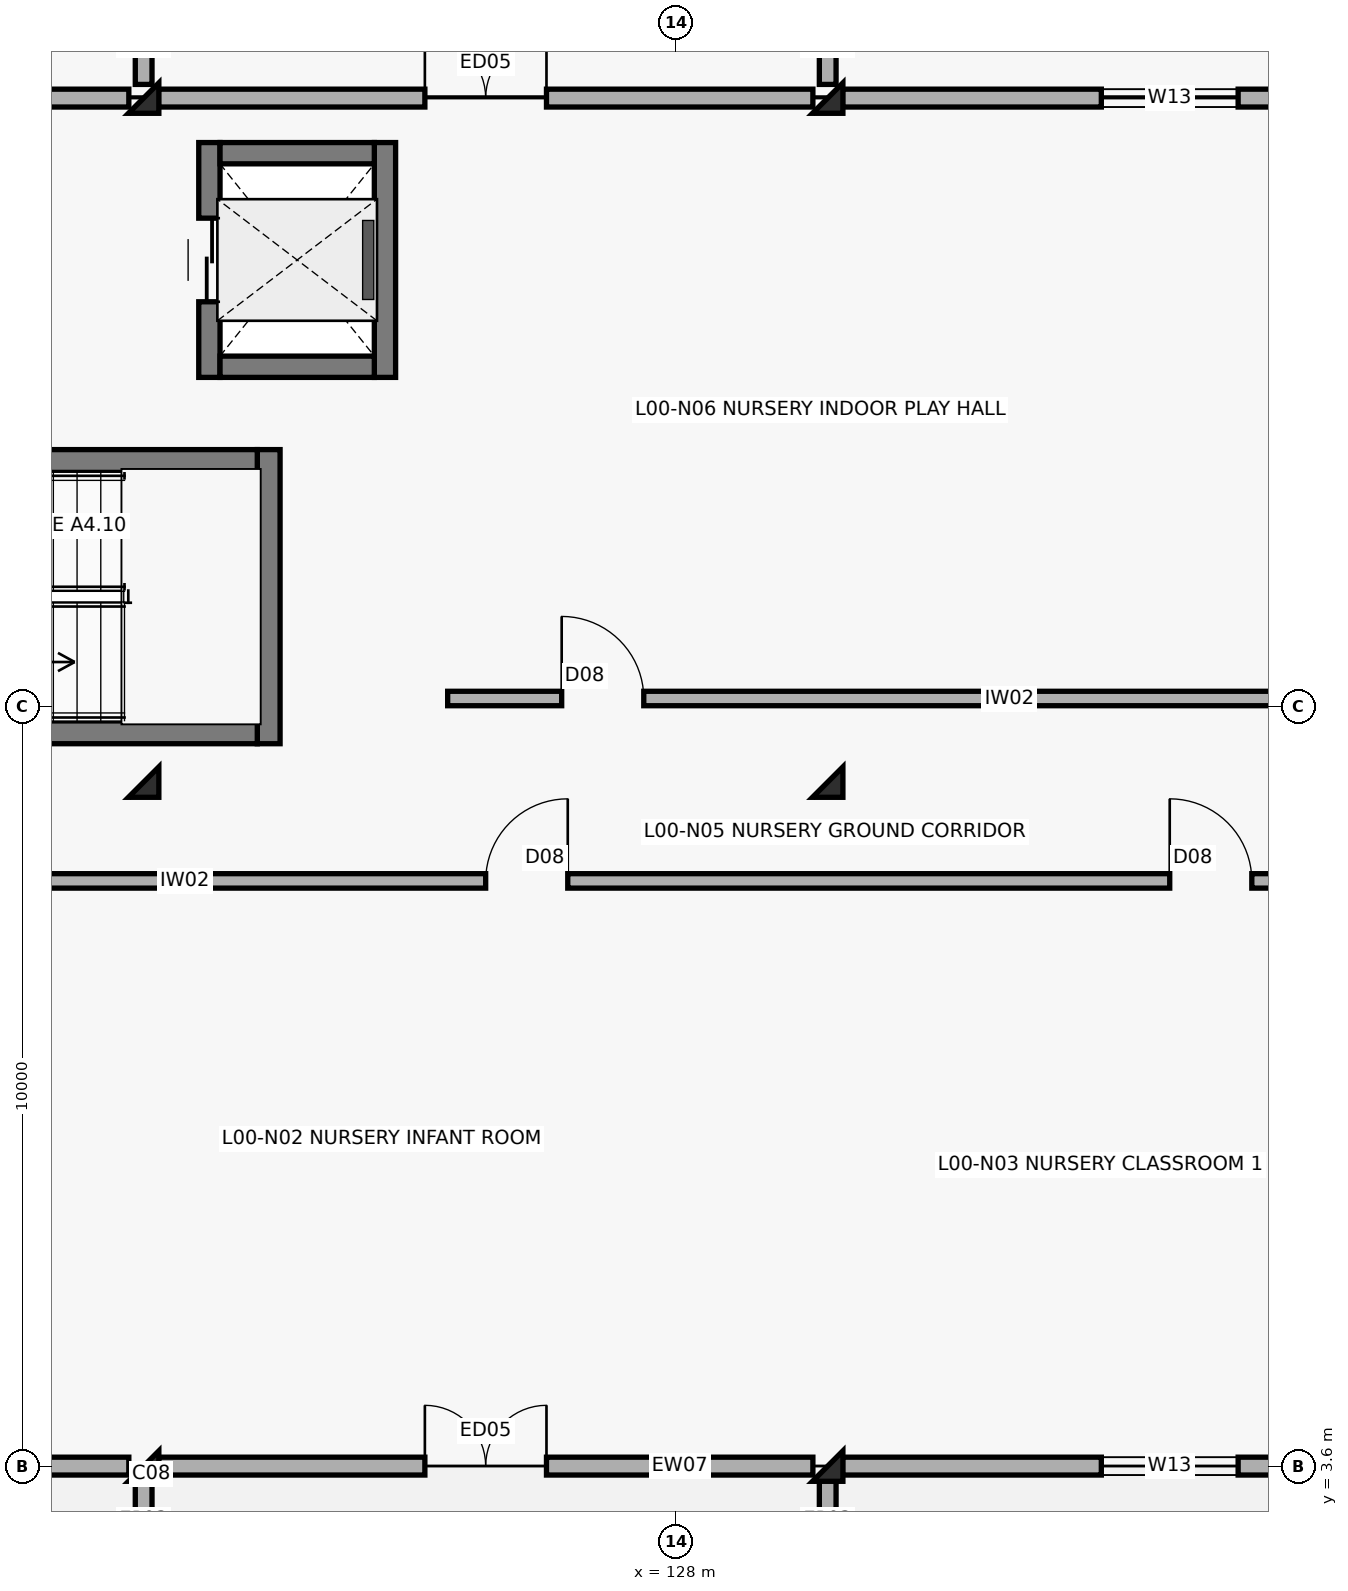
"""IFC4 building model, lengths in metres.
Left out: names, types, materials, properties, quantities, classifications, styles, units other than length and angle.
Written with IfcOpenShell. Run it as: python <this file> out.ifc"""

import sys

from ifc_helpers import new_model, si_unit, direction, frame, frame_2d, origin, origin_2d, place, context, subcontext, project, spatial, rectangle, extrude, element, fill, save


model = new_model("IFC4")
c1 = context("Model", 3, precision=1e-05, world=origin(), true_north=direction((0.0, 1.0)))
c2 = subcontext(c1, "Body", "Model", "MODEL_VIEW")
j1 = project(units=[si_unit("LENGTHUNIT", "METRE"), si_unit("PLANEANGLEUNIT", "RADIAN")], contexts=[c1])
p1 = place(None, origin())
s1 = spatial("IfcSite", under=j1, at=p1, CompositionType="ELEMENT")
p2 = place(p1, origin())
s2 = spatial("IfcBuilding", under=s1, at=p2, CompositionType="ELEMENT")
p3 = place(p2, origin())
s3 = spatial("IfcBuildingStorey", under=s2, at=p3, CompositionType="ELEMENT", Elevation=0.0)
for number, where, z_axis, x_axis in (
    (1, (121.0, 3.6, 0.0), (0.0, 0.0, 1.0), (1.0, 0.0, 0.0)),
    (2, (121.0, 12.6, 0.0), (0.0, 0.0, 1.0), (1.0, 0.0, 0.0)),
    (3, (121.0, 21.6, 0.0), (0.0, 0.0, 1.0), (1.0, 0.0, 0.0)),
    (4, (130.0, 3.6, 0.0), (0.0, 0.0, 1.0), (1.0, 0.0, 0.0)),
    (5, (130.0, 12.6, 0.0), (0.0, 0.0, 1.0), (1.0, 0.0, 0.0)),
    (6, (130.0, 21.6, 0.0), (0.0, 0.0, 1.0), (1.0, 0.0, 0.0)),
):
    element("IfcColumn", number, at=place(p3, frame(where, z_axis=z_axis, x_axis=x_axis)), inside=s3, PredefinedType="COLUMN", context=c2, shape_type="SweptSolid", body=[
        extrude(rectangle(XDim=0.4, YDim=0.4, at=origin_2d()), origin(), (0.0, 0.0, 1.0), 4.5),
    ])
p4 = place(p3, frame((112.195, 3.6, 0.0), z_axis=(0.0, 0.0, 1.0), x_axis=(1.0, 0.0, 0.0)))
e7 = element("IfcWall", 7, at=p4, inside=s3, PredefinedType="SOLIDWALL", context=c2, shape_type="SweptSolid", body=[
    extrude(rectangle(XDim=8.61, YDim=0.235, at=frame_2d((4.305, 0.0))), origin(), (0.0, 0.0, 1.0), 3.5),
])
p5 = place(p4, frame((3.405, 0.0, 0.45)))
e8 = element("IfcOpeningElement", 8, at=p5, cuts=e7, PredefinedType="OPENING", context=c2, shape_type="SweptSolid", body=[
    extrude(rectangle(XDim=1.8, YDim=1.8, at=frame_2d((0.9, 0.9))), frame((0.0, 0.127, 0.0), z_axis=(0.0, -1.0, 0.0), x_axis=(1.0, 0.0, 0.0)), (0.0, 0.0, 1.0), 0.255),
])
p6 = place(p3, frame((121.195, 3.6, 0.0), z_axis=(0.0, 0.0, 1.0), x_axis=(1.0, 0.0, 0.0)))
e9 = element("IfcWall", 9, at=p6, inside=s3, PredefinedType="SOLIDWALL", context=c2, shape_type="SweptSolid", body=[
    extrude(rectangle(XDim=8.61, YDim=0.235, at=frame_2d((4.305, 0.0))), origin(), (0.0, 0.0, 1.0), 3.5),
])
p7 = place(p6, frame((3.505, 0.0, 0.0)))
e10 = element("IfcOpeningElement", 10, at=p7, cuts=e9, PredefinedType="OPENING", context=c2, shape_type="SweptSolid", body=[
    extrude(rectangle(XDim=1.6, YDim=2.2, at=frame_2d((0.8, 1.1))), frame((0.0, 0.127, 0.0), z_axis=(0.0, -1.0, 0.0), x_axis=(1.0, 0.0, 0.0)), (0.0, 0.0, 1.0), 0.255),
])
p8 = place(p3, frame((130.195, 3.6, 0.0), z_axis=(0.0, 0.0, 1.0), x_axis=(1.0, 0.0, 0.0)))
e11 = element("IfcWall", 11, at=p8, inside=s3, PredefinedType="SOLIDWALL", context=c2, shape_type="SweptSolid", body=[
    extrude(rectangle(XDim=8.61, YDim=0.235, at=frame_2d((4.305, 0.0))), origin(), (0.0, 0.0, 1.0), 3.5),
])
p9 = place(p8, frame((3.405, 0.0, 0.45)))
e12 = element("IfcOpeningElement", 12, at=p9, cuts=e11, PredefinedType="OPENING", context=c2, shape_type="SweptSolid", body=[
    extrude(rectangle(XDim=1.8, YDim=1.8, at=frame_2d((0.9, 0.9))), frame((0.0, 0.127, 0.0), z_axis=(0.0, -1.0, 0.0), x_axis=(1.0, 0.0, 0.0)), (0.0, 0.0, 1.0), 0.255),
])
p10 = place(p3, frame((112.195, 21.6, 0.0), z_axis=(0.0, 0.0, 1.0), x_axis=(1.0, 0.0, 0.0)))
e13 = element("IfcWall", 13, at=p10, inside=s3, PredefinedType="SOLIDWALL", context=c2, shape_type="SweptSolid", body=[
    extrude(rectangle(XDim=8.61, YDim=0.235, at=frame_2d((4.305, 0.0))), origin(), (0.0, 0.0, 1.0), 3.5),
])
p11 = place(p10, frame((3.405, 0.0, 0.45)))
e14 = element("IfcOpeningElement", 14, at=p11, cuts=e13, PredefinedType="OPENING", context=c2, shape_type="SweptSolid", body=[
    extrude(rectangle(XDim=1.8, YDim=1.8, at=frame_2d((0.9, 0.9))), frame((0.0, 0.127, 0.0), z_axis=(0.0, -1.0, 0.0), x_axis=(1.0, 0.0, 0.0)), (0.0, 0.0, 1.0), 0.255),
])
p12 = place(p3, frame((121.195, 21.6, 0.0), z_axis=(0.0, 0.0, 1.0), x_axis=(1.0, 0.0, 0.0)))
e15 = element("IfcWall", 15, at=p12, inside=s3, PredefinedType="SOLIDWALL", context=c2, shape_type="SweptSolid", body=[
    extrude(rectangle(XDim=8.61, YDim=0.235, at=frame_2d((4.305, 0.0))), origin(), (0.0, 0.0, 1.0), 3.5),
])
p13 = place(p12, frame((3.505, 0.0, 0.0)))
e16 = element("IfcOpeningElement", 16, at=p13, cuts=e15, PredefinedType="OPENING", context=c2, shape_type="SweptSolid", body=[
    extrude(rectangle(XDim=1.6, YDim=2.2, at=frame_2d((0.8, 1.1))), frame((0.0, 0.127, 0.0), z_axis=(0.0, -1.0, 0.0), x_axis=(1.0, 0.0, 0.0)), (0.0, 0.0, 1.0), 0.255),
])
p14 = place(p3, frame((130.195, 21.6, 0.0), z_axis=(0.0, 0.0, 1.0), x_axis=(1.0, 0.0, 0.0)))
e17 = element("IfcWall", 17, at=p14, inside=s3, PredefinedType="SOLIDWALL", context=c2, shape_type="SweptSolid", body=[
    extrude(rectangle(XDim=8.61, YDim=0.235, at=frame_2d((4.305, 0.0))), origin(), (0.0, 0.0, 1.0), 3.5),
])
p15 = place(p14, frame((3.405, 0.0, 0.45)))
e18 = element("IfcOpeningElement", 18, at=p15, cuts=e17, PredefinedType="OPENING", context=c2, shape_type="SweptSolid", body=[
    extrude(rectangle(XDim=1.8, YDim=1.8, at=frame_2d((0.9, 0.9))), frame((0.0, 0.127, 0.0), z_axis=(0.0, -1.0, 0.0), x_axis=(1.0, 0.0, 0.0)), (0.0, 0.0, 1.0), 0.255),
])
for number, where, z_axis, x_axis in (
    (19, (121.0, 2.55, 0.0), (0.0, 0.0, 1.0), (0.0, 1.0, 0.0)),
    (20, (121.0, 21.78, 0.0), (0.0, 0.0, 1.0), (0.0, 1.0, 0.0)),
    (21, (130.0, 2.55, 0.0), (0.0, 0.0, 1.0), (0.0, 1.0, 0.0)),
    (22, (130.0, 21.78, 0.0), (0.0, 0.0, 1.0), (0.0, 1.0, 0.0)),
):
    element("IfcWall", number, at=place(p3, frame(where, z_axis=z_axis, x_axis=x_axis)), inside=s3, PredefinedType="PARAPET", context=c2, shape_type="SweptSolid", body=[
        extrude(rectangle(XDim=0.87, YDim=0.22, at=frame_2d((0.435, 0.0))), origin(), (0.0, 0.0, 1.0), 4.5),
    ])
p16 = place(p3, frame((122.645, 13.105, 0.0), z_axis=(0.0, 0.0, 1.0), x_axis=(0.0, 1.0, 0.0)))
e23 = element("IfcWall", 23, at=p16, inside=s3, PredefinedType="SHEAR", context=c2, shape_type="SweptSolid", body=[
    extrude(rectangle(XDim=3.87, YDim=0.3, at=frame_2d((1.935, 0.0))), origin(), (0.0, 0.0, 1.0), 4.5),
])
for number, where, z_axis, x_axis in (
    (24, (114.805, 13.255, 0.0), (0.0, 0.0, 1.0), (1.0, 0.0, 0.0)),
    (25, (114.805, 16.825, 0.0), (0.0, 0.0, 1.0), (1.0, 0.0, 0.0)),
):
    element("IfcWall", number, at=place(p3, frame(where, z_axis=z_axis, x_axis=x_axis)), inside=s3, PredefinedType="SHEAR", context=c2, shape_type="SweptSolid", body=[
        extrude(rectangle(XDim=7.69, YDim=0.3, at=frame_2d((3.845, 0.0))), origin(), (0.0, 0.0, 1.0), 4.5),
    ])
p17 = place(p3, frame((121.865, 17.925, 0.0), z_axis=(0.0, 0.0, 1.0), x_axis=(0.0, 1.0, 0.0)))
e26 = element("IfcWall", 26, at=p17, inside=s3, PredefinedType="SHEAR", context=c2, shape_type="SweptSolid", body=[
    extrude(rectangle(XDim=3.09, YDim=0.28, at=frame_2d((1.545, 0.0))), origin(), (0.0, 0.0, 1.0), 4.5),
])
p18 = place(p17, frame((0.995, 0.0, 0.0)))
e27 = element("IfcOpeningElement", 27, at=p18, cuts=e26, PredefinedType="OPENING", context=c2, shape_type="SweptSolid", body=[
    extrude(rectangle(XDim=1.1, YDim=2.15, at=frame_2d((0.55, 1.075))), frame((0.0, 0.15, 0.0), z_axis=(0.0, -1.0, 0.0), x_axis=(1.0, 0.0, 0.0)), (0.0, 0.0, 1.0), 0.3),
])
p19 = place(p3, frame((124.175, 17.925, 0.0), z_axis=(0.0, 0.0, 1.0), x_axis=(0.0, 1.0, 0.0)))
e28 = element("IfcWall", 28, at=p19, inside=s3, PredefinedType="SHEAR", context=c2, shape_type="SweptSolid", body=[
    extrude(rectangle(XDim=3.09, YDim=0.28, at=frame_2d((1.545, 0.0))), origin(), (0.0, 0.0, 1.0), 4.5),
])
for number, where, z_axis, x_axis in (
    (29, (122.005, 18.065, 0.0), (0.0, 0.0, 1.0), (1.0, 0.0, 0.0)),
    (30, (122.005, 20.875, 0.0), (0.0, 0.0, 1.0), (1.0, 0.0, 0.0)),
):
    element("IfcWall", number, at=place(p3, frame(where, z_axis=z_axis, x_axis=x_axis)), inside=s3, PredefinedType="SHEAR", context=c2, shape_type="SweptSolid", body=[
        extrude(rectangle(XDim=2.03, YDim=0.28, at=frame_2d((1.015, 0.0))), origin(), (0.0, 0.0, 1.0), 4.5),
    ])
p20 = place(p3, frame((113.0, 11.3, 0.0), z_axis=(0.0, 0.0, 1.0), x_axis=(1.0, 0.0, 0.0)))
e31 = element("IfcWall", 31, at=p20, inside=s3, PredefinedType="SOLIDWALL", context=c2, shape_type="SweptSolid", body=[
    extrude(rectangle(XDim=34.0, YDim=0.19, at=frame_2d((17.0, 0.0))), origin(), (0.0, 0.0, 1.0), 3.6),
])
p21 = place(p20, frame((3.5, 0.0, 0.0)))
e32 = element("IfcOpeningElement", 32, at=p21, cuts=e31, PredefinedType="OPENING", context=c2, shape_type="SweptSolid", body=[
    extrude(rectangle(XDim=1.08, YDim=2.15, at=frame_2d((0.54, 1.075))), frame((0.0, 0.105, 0.0), z_axis=(0.0, -1.0, 0.0), x_axis=(1.0, 0.0, 0.0)), (0.0, 0.0, 1.0), 0.21),
])
p22 = place(p20, frame((12.5, 0.0, 0.0)))
e33 = element("IfcOpeningElement", 33, at=p22, cuts=e31, PredefinedType="OPENING", context=c2, shape_type="SweptSolid", body=[
    extrude(rectangle(XDim=1.08, YDim=2.15, at=frame_2d((0.54, 1.075))), frame((0.0, 0.105, 0.0), z_axis=(0.0, -1.0, 0.0), x_axis=(1.0, 0.0, 0.0)), (0.0, 0.0, 1.0), 0.21),
])
p23 = place(p20, frame((21.5, 0.0, 0.0)))
e34 = element("IfcOpeningElement", 34, at=p23, cuts=e31, PredefinedType="OPENING", context=c2, shape_type="SweptSolid", body=[
    extrude(rectangle(XDim=1.08, YDim=2.15, at=frame_2d((0.54, 1.075))), frame((0.0, 0.105, 0.0), z_axis=(0.0, -1.0, 0.0), x_axis=(1.0, 0.0, 0.0)), (0.0, 0.0, 1.0), 0.21),
])
p24 = place(p20, frame((30.0, 0.0, 0.0)))
e35 = element("IfcOpeningElement", 35, at=p24, cuts=e31, PredefinedType="OPENING", context=c2, shape_type="SweptSolid", body=[
    extrude(rectangle(XDim=1.08, YDim=2.15, at=frame_2d((0.54, 1.075))), frame((0.0, 0.105, 0.0), z_axis=(0.0, -1.0, 0.0), x_axis=(1.0, 0.0, 0.0)), (0.0, 0.0, 1.0), 0.21),
])
p25 = place(p3, frame((125.0, 13.7, 0.0), z_axis=(0.0, 0.0, 1.0), x_axis=(1.0, 0.0, 0.0)))
e36 = element("IfcWall", 36, at=p25, inside=s3, PredefinedType="SOLIDWALL", context=c2, shape_type="SweptSolid", body=[
    extrude(rectangle(XDim=22.0, YDim=0.19, at=frame_2d((11.0, 0.0))), origin(), (0.0, 0.0, 1.0), 3.6),
])
p26 = place(p25, frame((1.5, 0.0, 0.0)))
e37 = element("IfcOpeningElement", 37, at=p26, cuts=e36, PredefinedType="OPENING", context=c2, shape_type="SweptSolid", body=[
    extrude(rectangle(XDim=1.08, YDim=2.15, at=frame_2d((0.54, 1.075))), frame((0.0, 0.105, 0.0), z_axis=(0.0, -1.0, 0.0), x_axis=(1.0, 0.0, 0.0)), (0.0, 0.0, 1.0), 0.21),
])
p27 = place(p25, frame((12.2, 0.0, 0.0)))
e38 = element("IfcOpeningElement", 38, at=p27, cuts=e36, PredefinedType="OPENING", context=c2, shape_type="SweptSolid", body=[
    extrude(rectangle(XDim=1.12, YDim=2.15, at=frame_2d((0.56, 1.075))), frame((0.0, 0.105, 0.0), z_axis=(0.0, -1.0, 0.0), x_axis=(1.0, 0.0, 0.0)), (0.0, 0.0, 1.0), 0.21),
])
p28 = place(p25, frame((17.4, 0.0, 0.0)))
e39 = element("IfcOpeningElement", 39, at=p28, cuts=e36, PredefinedType="OPENING", context=c2, shape_type="SweptSolid", body=[
    extrude(rectangle(XDim=0.88, YDim=2.1, at=frame_2d((0.44, 1.05))), frame((0.0, 0.105, 0.0), z_axis=(0.0, -1.0, 0.0), x_axis=(1.0, 0.0, 0.0)), (0.0, 0.0, 1.0), 0.21),
])
p29 = place(p25, frame((20.2, 0.0, 0.0)))
e40 = element("IfcOpeningElement", 40, at=p29, cuts=e36, PredefinedType="OPENING", context=c2, shape_type="SweptSolid", body=[
    extrude(rectangle(XDim=0.95, YDim=2.1, at=frame_2d((0.475, 1.05))), frame((0.0, 0.105, 0.0), z_axis=(0.0, -1.0, 0.0), x_axis=(1.0, 0.0, 0.0)), (0.0, 0.0, 1.0), 0.21),
])
p30 = place(p7, origin())
e41 = element("IfcDoor", 41, at=p30, inside=s3, OperationType="DOUBLE_DOOR_SINGLE_SWING", PredefinedType="DOOR", context=c2, shape_type="SweptSolid", body=[
    extrude(rectangle(XDim=1.6, YDim=2.2, at=frame_2d((0.8, 1.1))), frame((0.0, 0.025, 0.0), z_axis=(0.0, -1.0, 0.0), x_axis=(1.0, 0.0, 0.0)), (0.0, 0.0, 1.0), 0.05),
])
fill(e10, e41)
p31 = place(p9, origin())
e42 = element("IfcWindow", 42, at=p31, inside=s3, PartitioningType="TRIPLE_PANEL_VERTICAL", PredefinedType="WINDOW", context=c2, shape_type="SweptSolid", body=[
    extrude(rectangle(XDim=1.8, YDim=1.8, at=frame_2d((0.9, 0.9))), frame((0.0, 0.03, 0.0), z_axis=(0.0, -1.0, 0.0), x_axis=(1.0, 0.0, 0.0)), (0.0, 0.0, 1.0), 0.06),
])
fill(e12, e42)
p32 = place(p13, origin())
e43 = element("IfcDoor", 43, at=p32, inside=s3, OperationType="DOUBLE_DOOR_SINGLE_SWING", PredefinedType="DOOR", context=c2, shape_type="SweptSolid", body=[
    extrude(rectangle(XDim=1.6, YDim=2.2, at=frame_2d((0.8, 1.1))), frame((0.0, 0.025, 0.0), z_axis=(0.0, -1.0, 0.0), x_axis=(1.0, 0.0, 0.0)), (0.0, 0.0, 1.0), 0.05),
])
fill(e16, e43)
p33 = place(p15, origin())
e44 = element("IfcWindow", 44, at=p33, inside=s3, PartitioningType="TRIPLE_PANEL_VERTICAL", PredefinedType="WINDOW", context=c2, shape_type="SweptSolid", body=[
    extrude(rectangle(XDim=1.8, YDim=1.8, at=frame_2d((0.9, 0.9))), frame((0.0, 0.03, 0.0), z_axis=(0.0, -1.0, 0.0), x_axis=(1.0, 0.0, 0.0)), (0.0, 0.0, 1.0), 0.06),
])
fill(e18, e44)
p34 = place(p18, origin())
e45 = element("IfcDoor", 45, at=p34, inside=s3, OperationType="DOUBLE_DOOR_SLIDING", PredefinedType="DOOR", context=c2, shape_type="SweptSolid", body=[
    extrude(rectangle(XDim=1.1, YDim=2.15, at=frame_2d((0.55, 1.075))), frame((0.0, 0.025, 0.0), z_axis=(0.0, -1.0, 0.0), x_axis=(1.0, 0.0, 0.0)), (0.0, 0.0, 1.0), 0.05),
])
fill(e27, e45)
p35 = place(p22, origin())
e46 = element("IfcDoor", 46, at=p35, inside=s3, OperationType="SINGLE_SWING_RIGHT", PredefinedType="DOOR", context=c2, shape_type="SweptSolid", body=[
    extrude(rectangle(XDim=1.08, YDim=2.15, at=frame_2d((0.54, 1.075))), frame((0.0, 0.025, 0.0), z_axis=(0.0, -1.0, 0.0), x_axis=(1.0, 0.0, 0.0)), (0.0, 0.0, 1.0), 0.05),
])
fill(e33, e46)
p36 = place(p23, origin())
e47 = element("IfcDoor", 47, at=p36, inside=s3, OperationType="SINGLE_SWING_LEFT", PredefinedType="DOOR", context=c2, shape_type="SweptSolid", body=[
    extrude(rectangle(XDim=1.08, YDim=2.15, at=frame_2d((0.54, 1.075))), frame((0.0, 0.025, 0.0), z_axis=(0.0, -1.0, 0.0), x_axis=(1.0, 0.0, 0.0)), (0.0, 0.0, 1.0), 0.05),
])
fill(e34, e47)
p37 = place(p26, origin())
e48 = element("IfcDoor", 48, at=p37, inside=s3, OperationType="SINGLE_SWING_LEFT", PredefinedType="DOOR", context=c2, shape_type="SweptSolid", body=[
    extrude(rectangle(XDim=1.08, YDim=2.15, at=frame_2d((0.54, 1.075))), frame((0.0, 0.025, 0.0), z_axis=(0.0, -1.0, 0.0), x_axis=(1.0, 0.0, 0.0)), (0.0, 0.0, 1.0), 0.05),
])
fill(e37, e48)
save(model, sys.argv[1])
